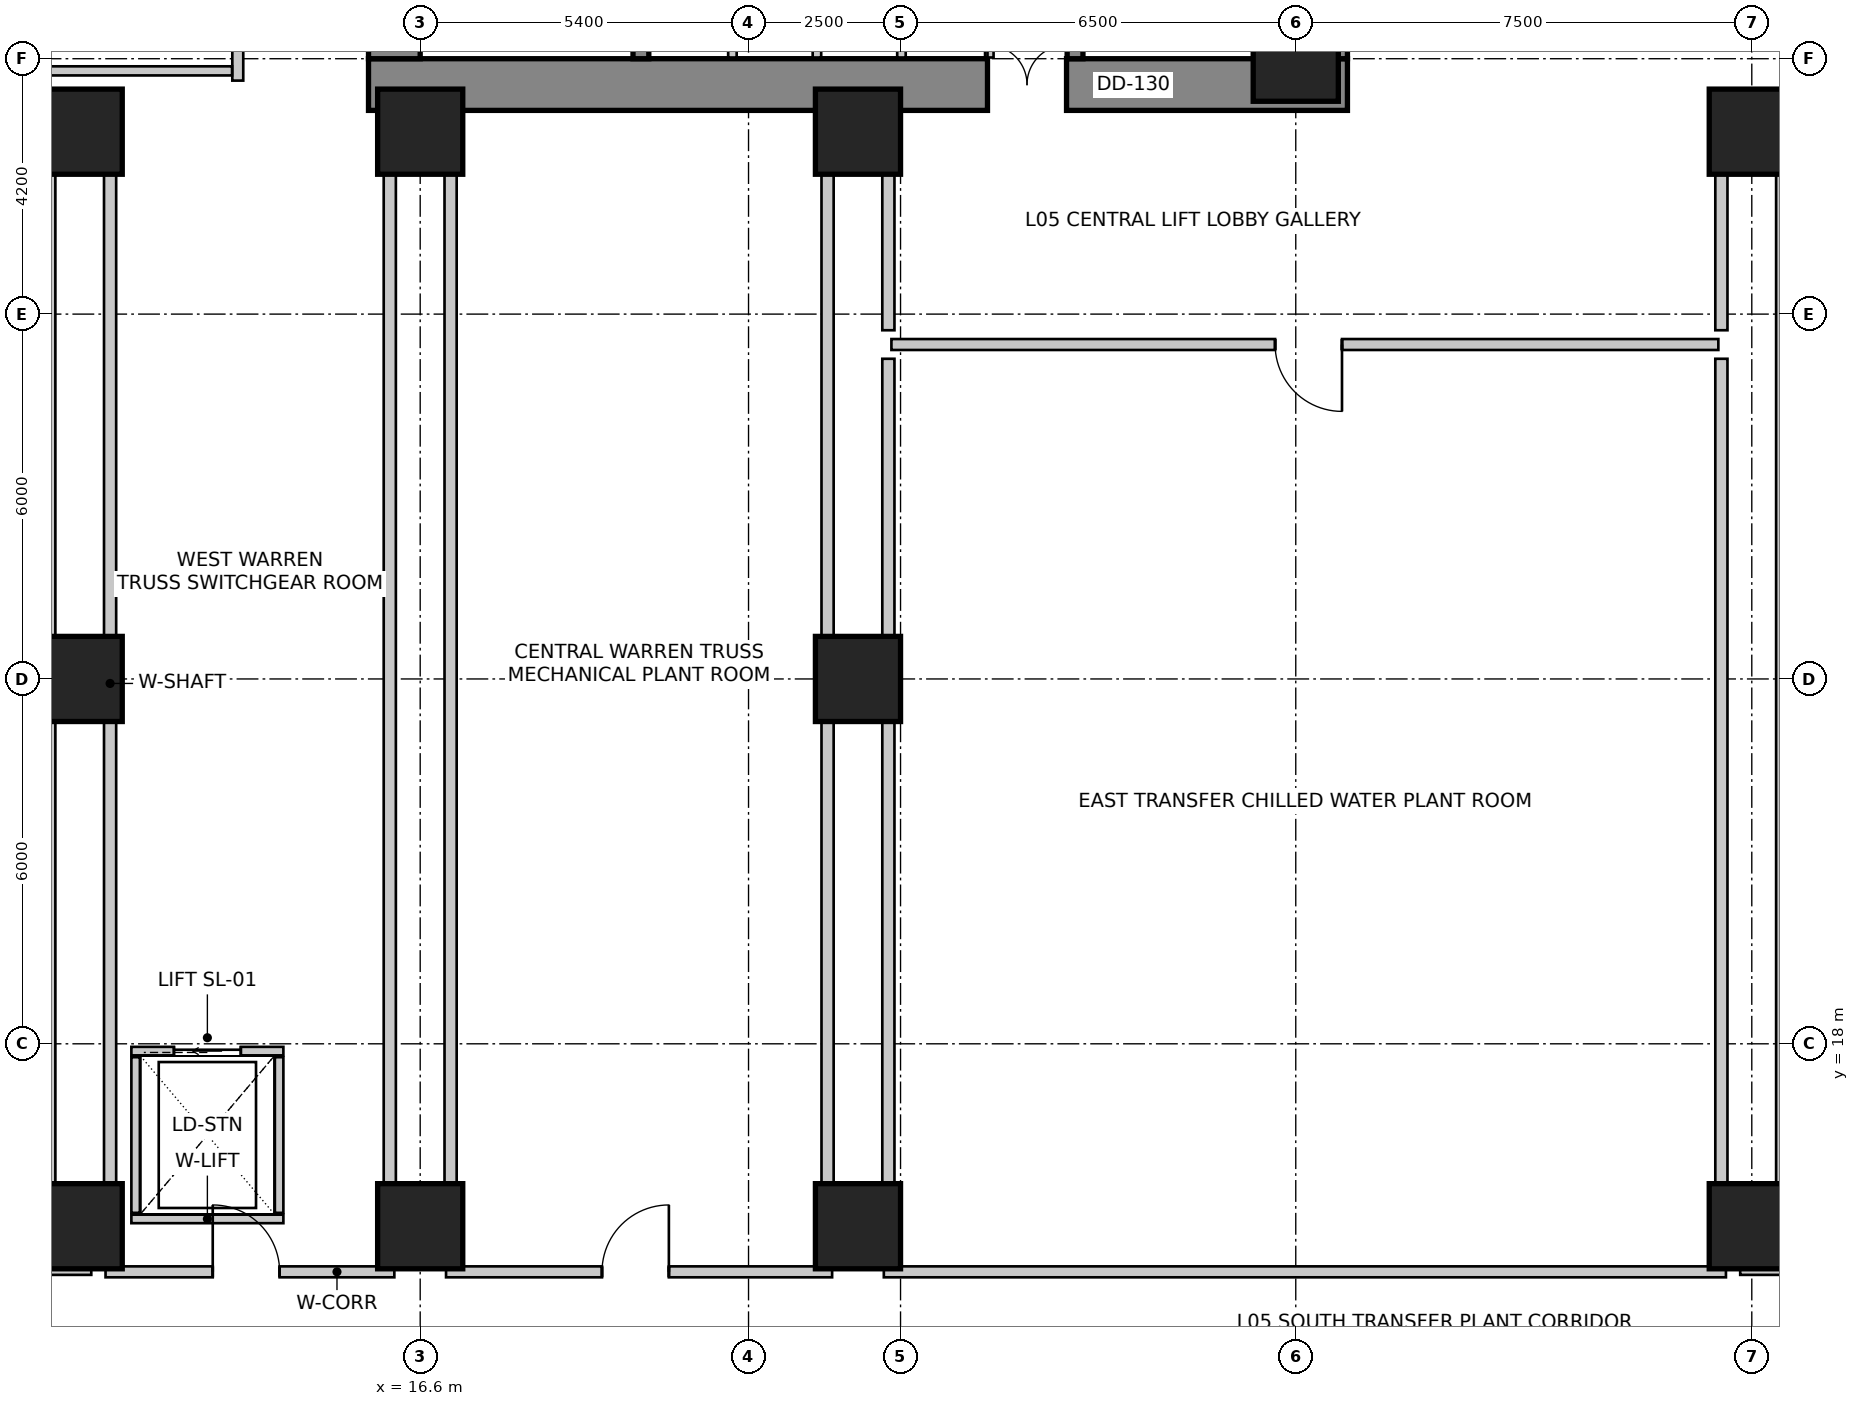
"""IFC4 building model, lengths in metres.
Left out: names, types, materials, properties, quantities, classifications, styles, units other than length and angle.
Written with IfcOpenShell. Run it as: python <this file> out.ifc"""

import sys

from ifc_helpers import new_model, si_unit, direction, frame, frame_2d, origin, origin_2d, place, context, subcontext, project, spatial, rectangle, extrude, source, transform, mapped, element, fill, save


model = new_model("IFC4")
c1 = context("Model", 3, precision=1e-05, world=origin(), true_north=direction((0.0, 1.0)))
c2 = subcontext(c1, "Body", "Model", "MODEL_VIEW")
j1 = project(units=[si_unit("LENGTHUNIT", "METRE"), si_unit("PLANEANGLEUNIT", "RADIAN")], contexts=[c1])
p1 = place(None, origin())
s1 = spatial("IfcSite", under=j1, at=p1, CompositionType="ELEMENT")
p2 = place(p1, origin())
s2 = spatial("IfcBuilding", under=s1, at=p2, CompositionType="ELEMENT")
p3 = place(p2, frame((0.0, 0.0, 21.6)))
s3 = spatial("IfcBuildingStorey", under=s2, at=p3, CompositionType="ELEMENT", Elevation=21.6)
p4 = place(p3, frame((15.75, 33.775, 0.0), z_axis=(0.0, 0.0, 1.0), x_axis=(1.0, 0.0, 0.0)))
e1 = element("IfcWall", 1, at=p4, inside=s3, PredefinedType="SHEAR", context=c2, shape_type="SweptSolid", body=[
    extrude(rectangle(XDim=16.1, YDim=0.85, at=frame_2d((8.05, 0.0))), origin(), (0.0, 0.0, 1.0), 5.4),
])
m1 = source(origin(), c2, "Body", "SweptSolid", [
    extrude(rectangle(XDim=1.3, YDim=2.15, at=frame_2d((0.65, 1.075))), frame((0.0, 0.435, 0.0), z_axis=(0.0, -1.0, 0.0), x_axis=(1.0, 0.0, 0.0)), (0.0, 0.0, 1.0), 0.87),
])
p5 = place(p4, frame((10.18, 0.0, 0.0)))
e2 = element("IfcOpeningElement", 2, at=p5, cuts=e1, PredefinedType="OPENING", context=c2, shape_type="MappedRepresentation", body=[
    mapped(m1, transform((0.0, 0.0, 0.0), scale=1.0)),
])
p6 = place(p3, frame((16.175, 34.2, 0.0), z_axis=(0.0, 0.0, 1.0), x_axis=(0.0, 1.0, 0.0)))
e3 = element("IfcWall", 3, at=p6, inside=s3, PredefinedType="SHEAR", context=c2, shape_type="SweptSolid", body=[
    extrude(rectangle(XDim=11.4, YDim=0.85, at=frame_2d((5.7, 0.0))), origin(), (0.0, 0.0, 1.0), 5.4),
])
m2 = source(origin(), c2, "Body", "SweptSolid", [
    extrude(rectangle(XDim=1.1, YDim=2.15, at=frame_2d((0.55, 1.075))), frame((0.0, 0.435, 0.0), z_axis=(0.0, -1.0, 0.0), x_axis=(1.0, 0.0, 0.0)), (0.0, 0.0, 1.0), 0.87),
])
p7 = place(p6, frame((7.15, 0.0, 0.0)))
e4 = element("IfcOpeningElement", 4, at=p7, cuts=e3, PredefinedType="OPENING", context=c2, shape_type="MappedRepresentation", body=[
    mapped(m2, transform((0.0, 0.0, 0.0), scale=1.0)),
])
p8 = place(p3, frame((31.425, 34.2, 0.0), z_axis=(0.0, 0.0, 1.0), x_axis=(0.0, 1.0, 0.0)))
e5 = element("IfcWall", 5, at=p8, inside=s3, PredefinedType="SHEAR", context=c2, shape_type="SweptSolid", body=[
    extrude(rectangle(XDim=11.4, YDim=0.85, at=frame_2d((5.7, 0.0))), origin(), (0.0, 0.0, 1.0), 5.4),
])
p9 = place(p8, frame((7.35, 0.0, 0.0)))
e6 = element("IfcOpeningElement", 6, at=p9, cuts=e5, PredefinedType="OPENING", context=c2, shape_type="MappedRepresentation", body=[
    mapped(m2, transform((0.0, 0.0, 0.0), scale=1.0)),
])
p10 = place(p3, frame((20.23, 34.2, 0.0), z_axis=(0.0, 0.0, 1.0), x_axis=(0.0, 1.0, 0.0)))
e7 = element("IfcWall", 7, at=p10, inside=s3, PredefinedType="SHEAR", context=c2, shape_type="SweptSolid", body=[
    extrude(rectangle(XDim=9.06, YDim=0.26, at=frame_2d((4.53, 0.0))), origin(), (0.0, 0.0, 1.0), 5.4),
])
m3 = source(origin(), c2, "Body", "SweptSolid", [
    extrude(rectangle(XDim=1.1, YDim=2.15, at=frame_2d((0.55, 1.075))), frame((0.0, 0.14, 0.0), z_axis=(0.0, -1.0, 0.0), x_axis=(1.0, 0.0, 0.0)), (0.0, 0.0, 1.0), 0.28),
])
p11 = place(p10, frame((7.45, 0.0, 0.0)))
e8 = element("IfcOpeningElement", 8, at=p11, cuts=e7, PredefinedType="OPENING", context=c2, shape_type="MappedRepresentation", body=[
    mapped(m3, transform((0.0, 0.0, 0.0), scale=1.0)),
])
p12 = place(p3, frame((27.37, 34.2, 0.0), z_axis=(0.0, 0.0, 1.0), x_axis=(0.0, 1.0, 0.0)))
e9 = element("IfcWall", 9, at=p12, inside=s3, PredefinedType="SHEAR", context=c2, shape_type="SweptSolid", body=[
    extrude(rectangle(XDim=9.06, YDim=0.26, at=frame_2d((4.53, 0.0))), origin(), (0.0, 0.0, 1.0), 5.4),
])
p13 = place(p12, frame((7.45, 0.0, 0.0)))
e10 = element("IfcOpeningElement", 10, at=p13, cuts=e9, PredefinedType="OPENING", context=c2, shape_type="MappedRepresentation", body=[
    mapped(m3, transform((0.0, 0.0, 0.0), scale=1.0)),
])
m4 = source(origin(), c2, "Body", "SweptSolid", [
    extrude(rectangle(XDim=1.4, YDim=1.4, at=origin_2d()), origin(), (0.0, 0.0, 1.0), 5.4),
])
for number, where, z_axis, x_axis in (
    (11, (11.0, 15.0, 0.0), (0.0, 0.0, 1.0), (1.0, 0.0, 0.0)),
    (12, (16.6, 15.0, 0.0), (0.0, 0.0, 1.0), (1.0, 0.0, 0.0)),
    (13, (23.8, 15.0, 0.0), (0.0, 0.0, 1.0), (1.0, 0.0, 0.0)),
    (14, (38.5, 15.0, 0.0), (0.0, 0.0, 1.0), (1.0, 0.0, 0.0)),
    (15, (11.0, 24.0, 0.0), (0.0, 0.0, 1.0), (1.0, 0.0, 0.0)),
    (16, (23.8, 24.0, 0.0), (0.0, 0.0, 1.0), (1.0, 0.0, 0.0)),
    (17, (11.0, 33.0, 0.0), (0.0, 0.0, 1.0), (1.0, 0.0, 0.0)),
    (18, (16.6, 33.0, 0.0), (0.0, 0.0, 1.0), (1.0, 0.0, 0.0)),
    (19, (23.8, 33.0, 0.0), (0.0, 0.0, 1.0), (1.0, 0.0, 0.0)),
    (20, (31.0, 34.2, 0.0), (0.0, 0.0, 1.0), (1.0, 0.0, 0.0)),
    (21, (38.5, 33.0, 0.0), (0.0, 0.0, 1.0), (1.0, 0.0, 0.0)),
):
    element("IfcColumn", number, at=place(p3, frame(where, z_axis=z_axis, x_axis=x_axis)), inside=s3, PredefinedType="COLUMN", context=c2, shape_type="MappedRepresentation", body=[
        mapped(m4, transform((0.0, 0.0, 0.0), scale=1.0)),
    ])
for number, where, z_axis, x_axis in (
    (22, (25.96, 34.22, 0.0), (0.0, 0.0, 1.0), (0.0, 1.0, 0.0)),
    (23, (21.735, 34.22, 0.0), (0.0, 0.0, 1.0), (0.0, 1.0, 0.0)),
    (24, (23.125, 34.22, 0.0), (0.0, 0.0, 1.0), (0.0, 1.0, 0.0)),
    (25, (24.515, 34.22, 0.0), (0.0, 0.0, 1.0), (0.0, 1.0, 0.0)),
):
    element("IfcWall", number, at=place(p3, frame(where, z_axis=z_axis, x_axis=x_axis)), inside=s3, PredefinedType="SOLIDWALL", context=c2, shape_type="SweptSolid", body=[
        extrude(rectangle(XDim=1.62, YDim=0.14, at=frame_2d((0.81, 0.0))), origin(), (0.0, 0.0, 1.0), 5.05),
    ])
p14 = place(p3, frame((11.85, 17.88, 0.0), z_axis=(0.0, 0.0, 1.0), x_axis=(1.0, 0.0, 0.0)))
e26 = element("IfcWall", 26, at=p14, inside=s3, PredefinedType="SOLIDWALL", context=c2, shape_type="SweptSolid", body=[
    extrude(rectangle(XDim=2.5, YDim=0.14, at=frame_2d((1.25, 0.0))), origin(), (0.0, 0.0, 1.0), 5.05),
])
m5 = source(origin(), c2, "Body", "SweptSolid", [
    extrude(rectangle(XDim=1.1, YDim=2.15, at=frame_2d((0.55, 1.075))), frame((0.0, 0.08, 0.0), z_axis=(0.0, -1.0, 0.0), x_axis=(1.0, 0.0, 0.0)), (0.0, 0.0, 1.0), 0.16),
])
p15 = place(p14, frame((0.7, 0.0, 0.0)))
e27 = element("IfcOpeningElement", 27, at=p15, cuts=e26, PredefinedType="OPENING", context=c2, shape_type="MappedRepresentation", body=[
    mapped(m5, transform((0.0, 0.0, 0.0), scale=1.0)),
])
p16 = place(p3, frame((11.85, 15.12, 0.0), z_axis=(0.0, 0.0, 1.0), x_axis=(1.0, 0.0, 0.0)))
e28 = element("IfcWall", 28, at=p16, inside=s3, PredefinedType="SOLIDWALL", context=c2, shape_type="SweptSolid", body=[
    extrude(rectangle(XDim=2.5, YDim=0.14, at=frame_2d((1.25, 0.0))), origin(), (0.0, 0.0, 1.0), 3.822),
])
for number, where, z_axis, x_axis in (
    (29, (11.92, 15.22, 0.0), (0.0, 0.0, 1.0), (0.0, 1.0, 0.0)),
    (30, (14.28, 15.22, 0.0), (0.0, 0.0, 1.0), (0.0, 1.0, 0.0)),
):
    element("IfcWall", number, at=place(p3, frame(where, z_axis=z_axis, x_axis=x_axis)), inside=s3, PredefinedType="SOLIDWALL", context=c2, shape_type="SweptSolid", body=[
        extrude(rectangle(XDim=2.56, YDim=0.14, at=frame_2d((1.28, 0.0))), origin(), (0.0, 0.0, 1.0), 5.05),
    ])
p17 = place(p3, frame((11.425, 14.25, 0.0), z_axis=(0.0, 0.0, 1.0), x_axis=(1.0, 0.0, 0.0)))
e31 = element("IfcWall", 31, at=p17, inside=s3, PredefinedType="PARTITIONING", context=c2, shape_type="SweptSolid", body=[
    extrude(rectangle(XDim=4.75, YDim=0.18, at=frame_2d((2.375, 0.0))), origin(), (0.0, 0.0, 1.0), 5.05),
])
m6 = source(origin(), c2, "Body", "SweptSolid", [
    extrude(rectangle(XDim=1.1, YDim=2.15, at=frame_2d((0.55, 1.075))), frame((0.0, 0.1, 0.0), z_axis=(0.0, -1.0, 0.0), x_axis=(1.0, 0.0, 0.0)), (0.0, 0.0, 1.0), 0.2),
])
p18 = place(p17, frame((1.763, 0.0, 0.0)))
e32 = element("IfcOpeningElement", 32, at=p18, cuts=e31, PredefinedType="OPENING", context=c2, shape_type="MappedRepresentation", body=[
    mapped(m6, transform((0.0, 0.0, 0.0), scale=1.0)),
])
p19 = place(p3, frame((17.025, 14.25, 0.0), z_axis=(0.0, 0.0, 1.0), x_axis=(1.0, 0.0, 0.0)))
e33 = element("IfcWall", 33, at=p19, inside=s3, PredefinedType="PARTITIONING", context=c2, shape_type="SweptSolid", body=[
    extrude(rectangle(XDim=6.35, YDim=0.18, at=frame_2d((3.175, 0.0))), origin(), (0.0, 0.0, 1.0), 5.05),
])
p20 = place(p19, frame((2.565, 0.0, 0.0)))
e34 = element("IfcOpeningElement", 34, at=p20, cuts=e33, PredefinedType="OPENING", context=c2, shape_type="MappedRepresentation", body=[
    mapped(m6, transform((0.0, 0.0, 0.0), scale=1.0)),
])
p21 = place(p3, frame((24.225, 14.25, 0.0), z_axis=(0.0, 0.0, 1.0), x_axis=(1.0, 0.0, 0.0)))
e35 = element("IfcWall", 35, at=p21, inside=s3, PredefinedType="PARTITIONING", context=c2, shape_type="SweptSolid", body=[
    extrude(rectangle(XDim=13.85, YDim=0.18, at=frame_2d((6.925, 0.0))), origin(), (0.0, 0.0, 1.0), 5.05),
])
p22 = place(p3, frame((37.95, 29.5, 0.0), z_axis=(0.0, 0.0, 1.0), x_axis=(-1.0, 0.0, 0.0)))
e36 = element("IfcWall", 36, at=p22, inside=s3, PredefinedType="PARTITIONING", context=c2, shape_type="SweptSolid", body=[
    extrude(rectangle(XDim=13.6, YDim=0.18, at=frame_2d((6.8, 0.0))), origin(), (0.0, 0.0, 1.0), 5.05),
])
p23 = place(p22, frame((6.19, 0.0, 0.0)))
e37 = element("IfcOpeningElement", 37, at=p23, cuts=e36, PredefinedType="OPENING", context=c2, shape_type="MappedRepresentation", body=[
    mapped(m6, transform((0.0, 0.0, 0.0), scale=1.0)),
])
p24 = place(p3, frame((13.6, 33.84, 0.0), z_axis=(0.0, 0.0, 1.0), x_axis=(0.0, 1.0, 0.0)))
e38 = element("IfcWall", 38, at=p24, inside=s3, PredefinedType="PARTITIONING", context=c2, shape_type="SweptSolid", body=[
    extrude(rectangle(XDim=5.32, YDim=0.18, at=frame_2d((2.66, 0.0))), origin(), (0.0, 0.0, 1.0), 5.05),
])
m7 = source(origin(), c2, "Body", "SweptSolid", [
    extrude(rectangle(XDim=0.9, YDim=2.15, at=frame_2d((0.45, 1.075))), frame((0.0, 0.1, 0.0), z_axis=(0.0, -1.0, 0.0), x_axis=(1.0, 0.0, 0.0)), (0.0, 0.0, 1.0), 0.2),
])
p25 = place(p24, frame((2.21, 0.0, 0.0)))
e39 = element("IfcOpeningElement", 39, at=p25, cuts=e38, PredefinedType="OPENING", context=c2, shape_type="MappedRepresentation", body=[
    mapped(m7, transform((0.0, 0.0, 0.0), scale=1.0)),
])
p26 = place(p3, frame((13.506, 34.0, 0.0), z_axis=(0.0, 0.0, 1.0), x_axis=(-1.0, 0.0, 0.0)))
e40 = element("IfcWall", 40, at=p26, inside=s3, PredefinedType="PARTITIONING", context=c2, shape_type="SweptSolid", body=[
    extrude(rectangle(XDim=7.706, YDim=0.15, at=frame_2d((3.853, 0.0))), origin(), (0.0, 0.0, 1.0), 3.842),
])
p27 = place(p3, frame((11.5, 33.362, 0.0), z_axis=(0.0, 0.0, 1.0), x_axis=(0.0, -1.0, 0.0)))
e41 = element("IfcWall", 41, at=p27, inside=s3, PredefinedType="SOLIDWALL", context=c2, shape_type="SweptSolid", body=[
    extrude(rectangle(XDim=18.872, YDim=0.2, at=frame_2d((9.436, 0.0))), origin(), (0.0, 0.0, 1.0), 3.042),
])
p28 = place(p3, frame((11.191, 14.3, 0.0), z_axis=(0.0, 0.0, 1.0), x_axis=(-1.0, 0.0, 0.0)))
e42 = element("IfcWall", 42, at=p28, inside=s3, PredefinedType="SOLIDWALL", context=c2, shape_type="SweptSolid", body=[
    extrude(rectangle(XDim=0.691, YDim=0.2, at=frame_2d((0.345, 0.0))), origin(), (0.0, 0.0, 1.0), 5.05),
])
p29 = place(p3, frame((10.5, 14.3, 0.0), z_axis=(0.0, 0.0, 1.0), x_axis=(0.0, 1.0, 0.0)))
e43 = element("IfcWall", 43, at=p29, inside=s3, PredefinedType="SOLIDWALL", context=c2, shape_type="SweptSolid", body=[
    extrude(rectangle(XDim=19.112, YDim=0.2, at=frame_2d((9.556, 0.0))), origin(), (0.0, 0.0, 1.0), 3.042),
])
for number, where, z_axis, x_axis in (
    (44, (17.1, 33.362, 0.0), (0.0, 0.0, 1.0), (0.0, -1.0, 0.0)),
    (45, (16.1, 14.49, 0.0), (0.0, 0.0, 1.0), (0.0, 1.0, 0.0)),
):
    element("IfcWall", number, at=place(p3, frame(where, z_axis=z_axis, x_axis=x_axis)), inside=s3, PredefinedType="SOLIDWALL", context=c2, shape_type="SweptSolid", body=[
        extrude(rectangle(XDim=18.872, YDim=0.2, at=frame_2d((9.436, 0.0))), origin(), (0.0, 0.0, 1.0), 3.042),
    ])
p30 = place(p3, frame((24.3, 33.412, 0.0), z_axis=(0.0, 0.0, 1.0), x_axis=(0.0, -1.0, 0.0)))
e46 = element("IfcWall", 46, at=p30, inside=s3, PredefinedType="SOLIDWALL", context=c2, shape_type="SweptSolid", body=[
    extrude(rectangle(XDim=3.678, YDim=0.2, at=frame_2d((1.839, 0.0))), origin(), (0.0, 0.0, 1.0), 3.042),
])
p31 = place(p3, frame((24.3, 29.265, 0.0), z_axis=(0.0, 0.0, 1.0), x_axis=(0.0, -1.0, 0.0)))
e47 = element("IfcWall", 47, at=p31, inside=s3, PredefinedType="SOLIDWALL", context=c2, shape_type="SweptSolid", body=[
    extrude(rectangle(XDim=14.775, YDim=0.2, at=frame_2d((7.388, 0.0))), origin(), (0.0, 0.0, 1.0), 3.042),
])
p32 = place(p3, frame((23.3, 14.49, 0.0), z_axis=(0.0, 0.0, 1.0), x_axis=(0.0, 1.0, 0.0)))
e48 = element("IfcWall", 48, at=p32, inside=s3, PredefinedType="SOLIDWALL", context=c2, shape_type="SweptSolid", body=[
    extrude(rectangle(XDim=18.872, YDim=0.2, at=frame_2d((9.436, 0.0))), origin(), (0.0, 0.0, 1.0), 3.042),
])
p33 = place(p3, frame((39.0, 33.412, 0.0), z_axis=(0.0, 0.0, 1.0), x_axis=(0.0, -1.0, 0.0)))
e49 = element("IfcWall", 49, at=p33, inside=s3, PredefinedType="SOLIDWALL", context=c2, shape_type="SweptSolid", body=[
    extrude(rectangle(XDim=18.78, YDim=0.2, at=frame_2d((9.39, 0.0))), origin(), (0.0, 0.0, 1.0), 3.042),
])
p34 = place(p3, frame((39.0, 14.3, 0.0), z_axis=(0.0, 0.0, 1.0), x_axis=(-1.0, 0.0, 0.0)))
e50 = element("IfcWall", 50, at=p34, inside=s3, PredefinedType="SOLIDWALL", context=c2, shape_type="SweptSolid", body=[
    extrude(rectangle(XDim=0.691, YDim=0.2, at=frame_2d((0.345, 0.0))), origin(), (0.0, 0.0, 1.0), 5.05),
])
p35 = place(p3, frame((38.0, 14.49, 0.0), z_axis=(0.0, 0.0, 1.0), x_axis=(0.0, 1.0, 0.0)))
e51 = element("IfcWall", 51, at=p35, inside=s3, PredefinedType="SOLIDWALL", context=c2, shape_type="SweptSolid", body=[
    extrude(rectangle(XDim=14.775, YDim=0.2, at=frame_2d((7.388, 0.0))), origin(), (0.0, 0.0, 1.0), 3.042),
])
p36 = place(p3, frame((38.0, 29.735, 0.0), z_axis=(0.0, 0.0, 1.0), x_axis=(0.0, 1.0, 0.0)))
e52 = element("IfcWall", 52, at=p36, inside=s3, PredefinedType="SOLIDWALL", context=c2, shape_type="SweptSolid", body=[
    extrude(rectangle(XDim=3.965, YDim=0.2, at=frame_2d((1.983, 0.0))), origin(), (0.0, 0.0, 1.0), 3.042),
])
m8 = source(origin(), c2, "Body", "SweptSolid", [
    extrude(rectangle(XDim=1.1, YDim=2.15, at=frame_2d((0.55, 1.075))), frame((0.0, 0.025, 0.0), z_axis=(0.0, -1.0, 0.0), x_axis=(1.0, 0.0, 0.0)), (0.0, 0.0, 1.0), 0.05),
])
p37 = place(p15, origin())
e53 = element("IfcDoor", 53, at=p37, inside=s3, OperationType="SLIDING_TO_LEFT", PredefinedType="DOOR", context=c2, shape_type="MappedRepresentation", body=[
    mapped(m8, transform((0.0, 0.0, 0.0), scale=1.0)),
])
fill(e27, e53)
m9 = source(origin(), c2, "Body", "SweptSolid", [
    extrude(rectangle(XDim=1.3, YDim=2.15, at=frame_2d((0.65, 1.075))), frame((0.0, 0.025, 0.0), z_axis=(0.0, -1.0, 0.0), x_axis=(1.0, 0.0, 0.0)), (0.0, 0.0, 1.0), 0.05),
])
p38 = place(p5, origin())
e54 = element("IfcDoor", 54, at=p38, inside=s3, OperationType="DOUBLE_DOOR_SINGLE_SWING", PredefinedType="DOOR", context=c2, shape_type="MappedRepresentation", body=[
    mapped(m9, transform((0.0, 0.0, 0.0), scale=1.0)),
])
fill(e2, e54)
m10 = source(origin(), c2, "Body", "SweptSolid", [
    extrude(rectangle(XDim=1.1, YDim=2.15, at=frame_2d((0.55, 1.075))), frame((0.0, 0.025, 0.0), z_axis=(0.0, -1.0, 0.0), x_axis=(1.0, 0.0, 0.0)), (0.0, 0.0, 1.0), 0.05),
])
p39 = place(p18, origin())
e55 = element("IfcDoor", 55, at=p39, inside=s3, OperationType="SINGLE_SWING_LEFT", PredefinedType="DOOR", context=c2, shape_type="MappedRepresentation", body=[
    mapped(m10, transform((0.0, 0.0, 0.0), scale=1.0)),
])
fill(e32, e55)
p40 = place(p20, origin())
e56 = element("IfcDoor", 56, at=p40, inside=s3, OperationType="SINGLE_SWING_RIGHT", PredefinedType="DOOR", context=c2, shape_type="MappedRepresentation", body=[
    mapped(m10, transform((0.0, 0.0, 0.0), scale=1.0)),
])
fill(e34, e56)
p41 = place(p23, origin())
e57 = element("IfcDoor", 57, at=p41, inside=s3, OperationType="SINGLE_SWING_LEFT", PredefinedType="DOOR", context=c2, shape_type="MappedRepresentation", body=[
    mapped(m10, transform((0.0, 0.0, 0.0), scale=1.0)),
])
fill(e37, e57)
save(model, sys.argv[1])
